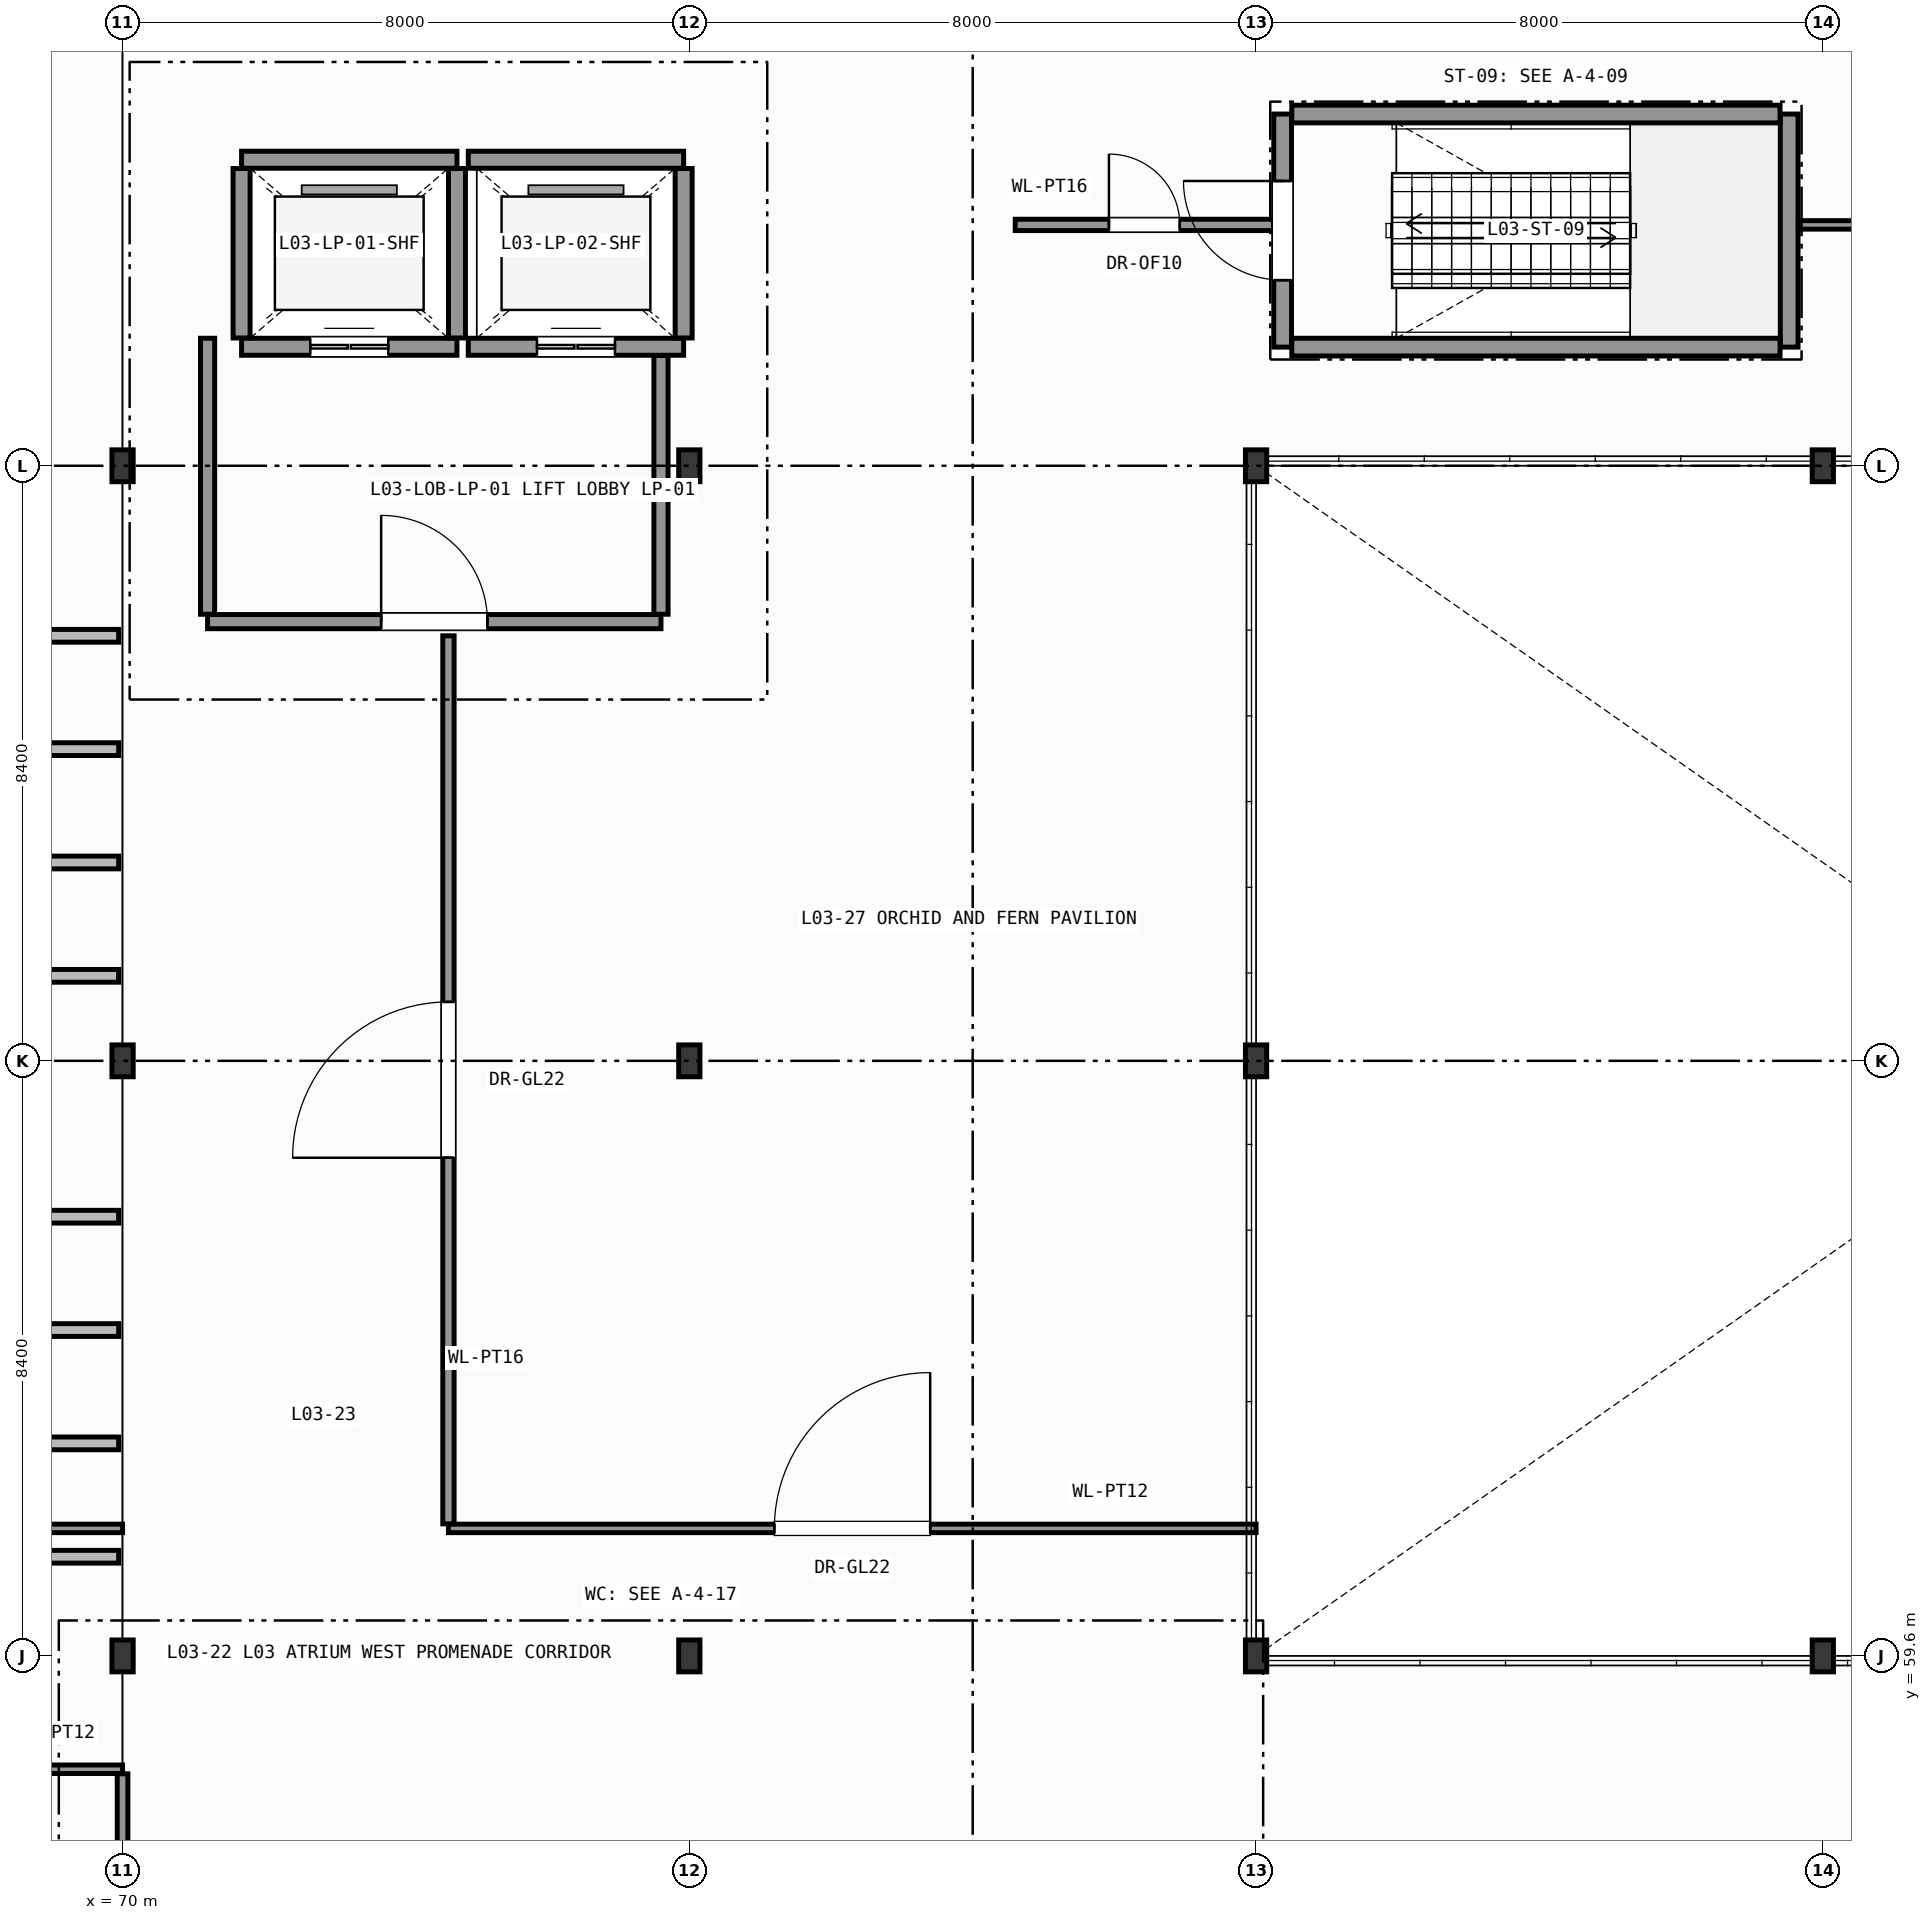
"""IFC4 building model, lengths in metres.
Left out: names, types, materials, properties, quantities, classifications, styles, units other than length and angle.
Written with IfcOpenShell. Run it as: python <this file> out.ifc"""

import sys

from ifc_helpers import new_model, si_unit, direction, frame, frame_2d, origin, origin_2d, place, context, subcontext, project, spatial, rectangle, i_section, extrude, element, fill, save


model = new_model("IFC4")
c1 = context("Model", 3, precision=1e-05, world=origin(), true_north=direction((0.0, 1.0)))
c2 = subcontext(c1, "Body", "Model", "MODEL_VIEW")
j1 = project(units=[si_unit("LENGTHUNIT", "METRE"), si_unit("PLANEANGLEUNIT", "RADIAN")], contexts=[c1])
p1 = place(None, origin())
s1 = spatial("IfcSite", under=j1, at=p1, CompositionType="ELEMENT")
p2 = place(p1, origin())
s2 = spatial("IfcBuilding", under=s1, at=p2, CompositionType="ELEMENT")
p3 = place(p2, frame((0.0, 0.0, 13.2)))
s3 = spatial("IfcBuildingStorey", under=s2, at=p3, CompositionType="ELEMENT", Elevation=13.2)
for number, where, z_axis, x_axis in (
    (1, (70.0, 59.6, 0.0), (0.0, 0.0, 1.0), (1.0, 0.0, 0.0)),
    (2, (70.0, 68.0, 0.0), (0.0, 0.0, 1.0), (1.0, 0.0, 0.0)),
    (3, (70.0, 76.4, 0.0), (0.0, 0.0, 1.0), (1.0, 0.0, 0.0)),
    (4, (78.0, 59.6, 0.0), (0.0, 0.0, 1.0), (1.0, 0.0, 0.0)),
    (5, (78.0, 68.0, 0.0), (0.0, 0.0, 1.0), (1.0, 0.0, 0.0)),
    (6, (78.0, 76.4, 0.0), (0.0, 0.0, 1.0), (1.0, 0.0, 0.0)),
    (7, (86.0, 59.6, 0.0), (0.0, 0.0, 1.0), (1.0, 0.0, 0.0)),
    (8, (86.0, 68.0, 0.0), (0.0, 0.0, 1.0), (1.0, 0.0, 0.0)),
    (9, (86.0, 76.4, 0.0), (0.0, 0.0, 1.0), (1.0, 0.0, 0.0)),
    (10, (94.0, 59.6, 0.0), (0.0, 0.0, 1.0), (1.0, 0.0, 0.0)),
    (11, (94.0, 76.4, 0.0), (0.0, 0.0, 1.0), (1.0, 0.0, 0.0)),
):
    element("IfcColumn", number, at=place(p3, frame(where, z_axis=z_axis, x_axis=x_axis)), inside=s3, PredefinedType="COLUMN", context=c2, shape_type="SweptSolid", body=[
        extrude(i_section(OverallWidth=0.3, OverallDepth=0.45, WebThickness=0.014, FlangeThickness=0.026, FilletRadius=0.027, at=origin_2d()), origin(), (0.0, 0.0, 1.0), 4.8),
    ])
p4 = place(p3, frame((86.375, 78.075, 0.0), z_axis=(0.0, 0.0, 1.0), x_axis=(0.0, 1.0, 0.0)))
e12 = element("IfcWall", 12, at=p4, inside=s3, PredefinedType="SHEAR", context=c2, shape_type="SweptSolid", body=[
    extrude(rectangle(XDim=3.29, YDim=0.25, at=frame_2d((1.645, 0.0))), origin(), (0.0, 0.0, 1.0), 4.56),
])
p5 = place(p4, frame((0.945, 0.0, 0.0)))
e13 = element("IfcOpeningElement", 13, at=p5, cuts=e12, PredefinedType="OPENING", context=c2, shape_type="SweptSolid", body=[
    extrude(rectangle(XDim=1.4, YDim=2.2, at=frame_2d((0.7, 1.1))), frame((0.0, 0.135, 0.0), z_axis=(0.0, -1.0, 0.0), x_axis=(1.0, 0.0, 0.0)), (0.0, 0.0, 1.0), 0.27),
])
p6 = place(p3, frame((93.525, 78.075, 0.0), z_axis=(0.0, 0.0, 1.0), x_axis=(0.0, 1.0, 0.0)))
e14 = element("IfcWall", 14, at=p6, inside=s3, PredefinedType="SHEAR", context=c2, shape_type="SweptSolid", body=[
    extrude(rectangle(XDim=3.29, YDim=0.25, at=frame_2d((1.645, 0.0))), origin(), (0.0, 0.0, 1.0), 4.56),
])
for number, where, z_axis, x_axis in (
    (15, (86.504, 78.075, 0.0), (0.0, 0.0, 1.0), (1.0, 0.0, 0.0)),
    (16, (86.504, 81.365, 0.0), (0.0, 0.0, 1.0), (1.0, 0.0, 0.0)),
):
    element("IfcWall", number, at=place(p3, frame(where, z_axis=z_axis, x_axis=x_axis)), inside=s3, PredefinedType="SHEAR", context=c2, shape_type="SweptSolid", body=[
        extrude(rectangle(XDim=6.892, YDim=0.25, at=frame_2d((3.446, 0.0))), origin(), (0.0, 0.0, 1.0), 4.56),
    ])
p7 = place(p3, frame((71.68, 78.08, 0.0), z_axis=(0.0, 0.0, 1.0), x_axis=(1.0, 0.0, 0.0)))
e17 = element("IfcWall", 17, at=p7, inside=s3, PredefinedType="SHEAR", context=c2, shape_type="SweptSolid", body=[
    extrude(rectangle(XDim=3.04, YDim=0.24, at=frame_2d((1.52, 0.0))), origin(), (0.0, 0.0, 1.0), 4.56),
])
p8 = place(p7, frame((0.97, 0.0, 0.0)))
e18 = element("IfcOpeningElement", 18, at=p8, cuts=e17, PredefinedType="OPENING", context=c2, shape_type="SweptSolid", body=[
    extrude(rectangle(XDim=1.1, YDim=2.2, at=frame_2d((0.55, 1.1))), frame((0.0, 0.13, 0.0), z_axis=(0.0, -1.0, 0.0), x_axis=(1.0, 0.0, 0.0)), (0.0, 0.0, 1.0), 0.26),
])
p9 = place(p3, frame((71.68, 80.72, 0.0), z_axis=(0.0, 0.0, 1.0), x_axis=(1.0, 0.0, 0.0)))
e19 = element("IfcWall", 19, at=p9, inside=s3, PredefinedType="SHEAR", context=c2, shape_type="SweptSolid", body=[
    extrude(rectangle(XDim=3.04, YDim=0.24, at=frame_2d((1.52, 0.0))), origin(), (0.0, 0.0, 1.0), 4.56),
])
for number, where, z_axis, x_axis in (
    (20, (71.68, 78.204, 0.0), (0.0, 0.0, 1.0), (0.0, 1.0, 0.0)),
    (21, (74.72, 78.204, 0.0), (0.0, 0.0, 1.0), (0.0, 1.0, 0.0)),
):
    element("IfcWall", number, at=place(p3, frame(where, z_axis=z_axis, x_axis=x_axis)), inside=s3, PredefinedType="SHEAR", context=c2, shape_type="SweptSolid", body=[
        extrude(rectangle(XDim=2.392, YDim=0.24, at=frame_2d((1.196, 0.0))), origin(), (0.0, 0.0, 1.0), 4.56),
    ])
p10 = place(p3, frame((74.88, 78.08, 0.0), z_axis=(0.0, 0.0, 1.0), x_axis=(1.0, 0.0, 0.0)))
e22 = element("IfcWall", 22, at=p10, inside=s3, PredefinedType="SHEAR", context=c2, shape_type="SweptSolid", body=[
    extrude(rectangle(XDim=3.04, YDim=0.24, at=frame_2d((1.52, 0.0))), origin(), (0.0, 0.0, 1.0), 4.56),
])
p11 = place(p10, frame((0.97, 0.0, 0.0)))
e23 = element("IfcOpeningElement", 23, at=p11, cuts=e22, PredefinedType="OPENING", context=c2, shape_type="SweptSolid", body=[
    extrude(rectangle(XDim=1.1, YDim=2.2, at=frame_2d((0.55, 1.1))), frame((0.0, 0.13, 0.0), z_axis=(0.0, -1.0, 0.0), x_axis=(1.0, 0.0, 0.0)), (0.0, 0.0, 1.0), 0.26),
])
p12 = place(p3, frame((74.88, 80.72, 0.0), z_axis=(0.0, 0.0, 1.0), x_axis=(1.0, 0.0, 0.0)))
e24 = element("IfcWall", 24, at=p12, inside=s3, PredefinedType="SHEAR", context=c2, shape_type="SweptSolid", body=[
    extrude(rectangle(XDim=3.04, YDim=0.24, at=frame_2d((1.52, 0.0))), origin(), (0.0, 0.0, 1.0), 4.56),
])
p13 = place(p3, frame((77.92, 78.204, 0.0), z_axis=(0.0, 0.0, 1.0), x_axis=(0.0, 1.0, 0.0)))
e25 = element("IfcWall", 25, at=p13, inside=s3, PredefinedType="SHEAR", context=c2, shape_type="SweptSolid", body=[
    extrude(rectangle(XDim=2.392, YDim=0.24, at=frame_2d((1.196, 0.0))), origin(), (0.0, 0.0, 1.0), 4.56),
])
p14 = place(p3, frame((71.2, 74.2, 0.0), z_axis=(0.0, 0.0, 1.0), x_axis=(1.0, 0.0, 0.0)))
e26 = element("IfcWall", 26, at=p14, inside=s3, PredefinedType="PARTITIONING", context=c2, shape_type="SweptSolid", body=[
    extrude(rectangle(XDim=6.4, YDim=0.2, at=frame_2d((3.2, 0.0))), origin(), (0.0, 0.0, 1.0), 4.56),
])
p15 = place(p14, frame((2.45, 0.0, 0.0)))
e27 = element("IfcOpeningElement", 27, at=p15, cuts=e26, PredefinedType="OPENING", context=c2, shape_type="SweptSolid", body=[
    extrude(rectangle(XDim=1.5, YDim=2.2, at=frame_2d((0.75, 1.1))), frame((0.0, 0.11, 0.0), z_axis=(0.0, -1.0, 0.0), x_axis=(1.0, 0.0, 0.0)), (0.0, 0.0, 1.0), 0.22),
])
p16 = place(p3, frame((71.2, 74.304, 0.0), z_axis=(0.0, 0.0, 1.0), x_axis=(0.0, 1.0, 0.0)))
e28 = element("IfcWall", 28, at=p16, inside=s3, PredefinedType="PARTITIONING", context=c2, shape_type="SweptSolid", body=[
    extrude(rectangle(XDim=3.896, YDim=0.2, at=frame_2d((1.948, 0.0))), origin(), (0.0, 0.0, 1.0), 4.56),
])
p17 = place(p3, frame((77.6, 74.304, 0.0), z_axis=(0.0, 0.0, 1.0), x_axis=(0.0, 1.0, 0.0)))
e29 = element("IfcWall", 29, at=p17, inside=s3, PredefinedType="PARTITIONING", context=c2, shape_type="SweptSolid", body=[
    extrude(rectangle(XDim=3.652, YDim=0.2, at=frame_2d((1.826, 0.0))), origin(), (0.0, 0.0, 1.0), 4.56),
])
p18 = place(p3, frame((43.6, 61.4, 0.0), z_axis=(0.0, 0.0, 1.0), x_axis=(1.0, 0.0, 0.0)))
e30 = element("IfcWall", 30, at=p18, inside=s3, PredefinedType="PARTITIONING", context=c2, shape_type="SweptSolid", body=[
    extrude(rectangle(XDim=26.4, YDim=0.12, at=frame_2d((13.2, 0.0))), origin(), (0.0, 0.0, 1.0), 4.56),
])
p19 = place(p18, frame((12.1, 0.0, 0.0)))
e31 = element("IfcOpeningElement", 31, at=p19, cuts=e30, PredefinedType="OPENING", context=c2, shape_type="SweptSolid", body=[
    extrude(rectangle(XDim=2.2, YDim=2.6, at=frame_2d((1.1, 1.3))), frame((0.0, 0.07, 0.0), z_axis=(0.0, -1.0, 0.0), x_axis=(1.0, 0.0, 0.0)), (0.0, 0.0, 1.0), 0.14),
])
p20 = place(p3, frame((64.6, 58.0, 0.0), z_axis=(0.0, 0.0, 1.0), x_axis=(1.0, 0.0, 0.0)))
e32 = element("IfcWall", 32, at=p20, inside=s3, PredefinedType="PARTITIONING", context=c2, shape_type="SweptSolid", body=[
    extrude(rectangle(XDim=5.4, YDim=0.12, at=frame_2d((2.7, 0.0))), origin(), (0.0, 0.0, 1.0), 4.56),
])
p21 = place(p20, frame((2.225, 0.0, 0.0)))
e33 = element("IfcOpeningElement", 33, at=p21, cuts=e32, PredefinedType="OPENING", context=c2, shape_type="SweptSolid", body=[
    extrude(rectangle(XDim=0.95, YDim=2.1, at=frame_2d((0.475, 1.05))), frame((0.0, 0.07, 0.0), z_axis=(0.0, -1.0, 0.0), x_axis=(1.0, 0.0, 0.0)), (0.0, 0.0, 1.0), 0.14),
])
p22 = place(p3, frame((70.0, 52.779, 0.0), z_axis=(0.0, 0.0, 1.0), x_axis=(0.0, 1.0, 0.0)))
e34 = element("IfcWall", 34, at=p22, inside=s3, PredefinedType="PARTITIONING", context=c2, shape_type="SweptSolid", body=[
    extrude(rectangle(XDim=5.157, YDim=0.15, at=frame_2d((2.579, 0.0))), origin(), (0.0, 0.0, 1.0), 4.255),
])
p23 = place(p22, frame((2.079, 0.0, 0.0)))
e35 = element("IfcOpeningElement", 35, at=p23, cuts=e34, PredefinedType="OPENING", context=c2, shape_type="SweptSolid", body=[
    extrude(rectangle(XDim=1.0, YDim=2.15, at=frame_2d((0.5, 1.075))), frame((0.0, 0.085, 0.0), z_axis=(0.0, -1.0, 0.0), x_axis=(1.0, 0.0, 0.0)), (0.0, 0.0, 1.0), 0.17),
])
p24 = place(p3, frame((74.6, 61.4, 0.0), z_axis=(0.0, 0.0, 1.0), x_axis=(1.0, 0.0, 0.0)))
e36 = element("IfcWall", 36, at=p24, inside=s3, PredefinedType="PARTITIONING", context=c2, shape_type="SweptSolid", body=[
    extrude(rectangle(XDim=11.4, YDim=0.12, at=frame_2d((5.7, 0.0))), origin(), (0.0, 0.0, 1.0), 4.56),
])
p25 = place(p24, frame((4.6, 0.0, 0.0)))
e37 = element("IfcOpeningElement", 37, at=p25, cuts=e36, PredefinedType="OPENING", context=c2, shape_type="SweptSolid", body=[
    extrude(rectangle(XDim=2.2, YDim=2.6, at=frame_2d((1.1, 1.3))), frame((0.0, 0.07, 0.0), z_axis=(0.0, -1.0, 0.0), x_axis=(1.0, 0.0, 0.0)), (0.0, 0.0, 1.0), 0.14),
])
p26 = place(p3, frame((74.6, 61.464, 0.0), z_axis=(0.0, 0.0, 1.0), x_axis=(0.0, 1.0, 0.0)))
e38 = element("IfcWall", 38, at=p26, inside=s3, PredefinedType="PARTITIONING", context=c2, shape_type="SweptSolid", body=[
    extrude(rectangle(XDim=12.536, YDim=0.16, at=frame_2d((6.268, 0.0))), origin(), (0.0, 0.0, 1.0), 4.56),
])
p27 = place(p26, frame((5.168, 0.0, 0.0)))
e39 = element("IfcOpeningElement", 39, at=p27, cuts=e38, PredefinedType="OPENING", context=c2, shape_type="SweptSolid", body=[
    extrude(rectangle(XDim=2.2, YDim=2.6, at=frame_2d((1.1, 1.3))), frame((0.0, 0.09, 0.0), z_axis=(0.0, -1.0, 0.0), x_axis=(1.0, 0.0, 0.0)), (0.0, 0.0, 1.0), 0.18),
])
p28 = place(p3, frame((93.654, 79.8, 0.0), z_axis=(0.0, 0.0, 1.0), x_axis=(1.0, 0.0, 0.0)))
e40 = element("IfcWall", 40, at=p28, inside=s3, PredefinedType="PARTITIONING", context=c2, shape_type="SweptSolid", body=[
    extrude(rectangle(XDim=19.746, YDim=0.12, at=frame_2d((9.873, 0.0))), origin(), (0.0, 0.0, 1.0), 4.185),
])
p29 = place(p28, frame((8.773, 0.0, 0.0)))
e41 = element("IfcOpeningElement", 41, at=p29, cuts=e40, PredefinedType="OPENING", context=c2, shape_type="SweptSolid", body=[
    extrude(rectangle(XDim=2.2, YDim=2.6, at=frame_2d((1.1, 1.3))), frame((0.0, 0.07, 0.0), z_axis=(0.0, -1.0, 0.0), x_axis=(1.0, 0.0, 0.0)), (0.0, 0.0, 1.0), 0.14),
])
p30 = place(p3, frame((82.6, 79.8, 0.0), z_axis=(0.0, 0.0, 1.0), x_axis=(1.0, 0.0, 0.0)))
e42 = element("IfcWall", 42, at=p30, inside=s3, PredefinedType="PARTITIONING", context=c2, shape_type="SweptSolid", body=[
    extrude(rectangle(XDim=3.646, YDim=0.16, at=frame_2d((1.823, 0.0))), origin(), (0.0, 0.0, 1.0), 4.215),
])
p31 = place(p30, frame((1.323, 0.0, 0.0)))
e43 = element("IfcOpeningElement", 43, at=p31, cuts=e42, PredefinedType="OPENING", context=c2, shape_type="SweptSolid", body=[
    extrude(rectangle(XDim=1.0, YDim=2.15, at=frame_2d((0.5, 1.075))), frame((0.0, 0.09, 0.0), z_axis=(0.0, -1.0, 0.0), x_axis=(1.0, 0.0, 0.0)), (0.0, 0.0, 1.0), 0.18),
])
p32 = place(p5, origin())
e44 = element("IfcDoor", 44, at=p32, inside=s3, OperationType="SINGLE_SWING_RIGHT", PredefinedType="DOOR", context=c2, shape_type="SweptSolid", body=[
    extrude(rectangle(XDim=1.4, YDim=2.2, at=frame_2d((0.7, 1.1))), frame((0.0, 0.025, 0.0), z_axis=(0.0, -1.0, 0.0), x_axis=(1.0, 0.0, 0.0)), (0.0, 0.0, 1.0), 0.05),
])
fill(e13, e44)
p33 = place(p8, origin())
e45 = element("IfcDoor", 45, at=p33, inside=s3, OperationType="DOUBLE_DOOR_SLIDING", PredefinedType="DOOR", context=c2, shape_type="SweptSolid", body=[
    extrude(rectangle(XDim=1.1, YDim=2.2, at=frame_2d((0.55, 1.1))), frame((0.0, 0.025, 0.0), z_axis=(0.0, -1.0, 0.0), x_axis=(1.0, 0.0, 0.0)), (0.0, 0.0, 1.0), 0.05),
])
fill(e18, e45)
p34 = place(p11, origin())
e46 = element("IfcDoor", 46, at=p34, inside=s3, OperationType="DOUBLE_DOOR_SLIDING", PredefinedType="DOOR", context=c2, shape_type="SweptSolid", body=[
    extrude(rectangle(XDim=1.1, YDim=2.2, at=frame_2d((0.55, 1.1))), frame((0.0, 0.025, 0.0), z_axis=(0.0, -1.0, 0.0), x_axis=(1.0, 0.0, 0.0)), (0.0, 0.0, 1.0), 0.05),
])
fill(e23, e46)
p35 = place(p15, origin())
e47 = element("IfcDoor", 47, at=p35, inside=s3, OperationType="SINGLE_SWING_LEFT", PredefinedType="DOOR", context=c2, shape_type="SweptSolid", body=[
    extrude(rectangle(XDim=1.5, YDim=2.2, at=frame_2d((0.75, 1.1))), frame((0.0, 0.025, 0.0), z_axis=(0.0, -1.0, 0.0), x_axis=(1.0, 0.0, 0.0)), (0.0, 0.0, 1.0), 0.05),
])
fill(e27, e47)
p36 = place(p25, origin())
e48 = element("IfcDoor", 48, at=p36, inside=s3, OperationType="SINGLE_SWING_RIGHT", PredefinedType="DOOR", context=c2, shape_type="SweptSolid", body=[
    extrude(rectangle(XDim=2.2, YDim=2.6, at=frame_2d((1.1, 1.3))), frame((0.0, 0.025, 0.0), z_axis=(0.0, -1.0, 0.0), x_axis=(1.0, 0.0, 0.0)), (0.0, 0.0, 1.0), 0.05),
])
fill(e37, e48)
p37 = place(p27, origin())
e49 = element("IfcDoor", 49, at=p37, inside=s3, OperationType="SINGLE_SWING_LEFT", PredefinedType="DOOR", context=c2, shape_type="SweptSolid", body=[
    extrude(rectangle(XDim=2.2, YDim=2.6, at=frame_2d((1.1, 1.3))), frame((0.0, 0.025, 0.0), z_axis=(0.0, -1.0, 0.0), x_axis=(1.0, 0.0, 0.0)), (0.0, 0.0, 1.0), 0.05),
])
fill(e39, e49)
p38 = place(p31, origin())
e50 = element("IfcDoor", 50, at=p38, inside=s3, OperationType="SINGLE_SWING_LEFT", PredefinedType="DOOR", context=c2, shape_type="SweptSolid", body=[
    extrude(rectangle(XDim=1.0, YDim=2.15, at=frame_2d((0.5, 1.075))), frame((0.0, 0.025, 0.0), z_axis=(0.0, -1.0, 0.0), x_axis=(1.0, 0.0, 0.0)), (0.0, 0.0, 1.0), 0.05),
])
fill(e43, e50)
save(model, sys.argv[1])
